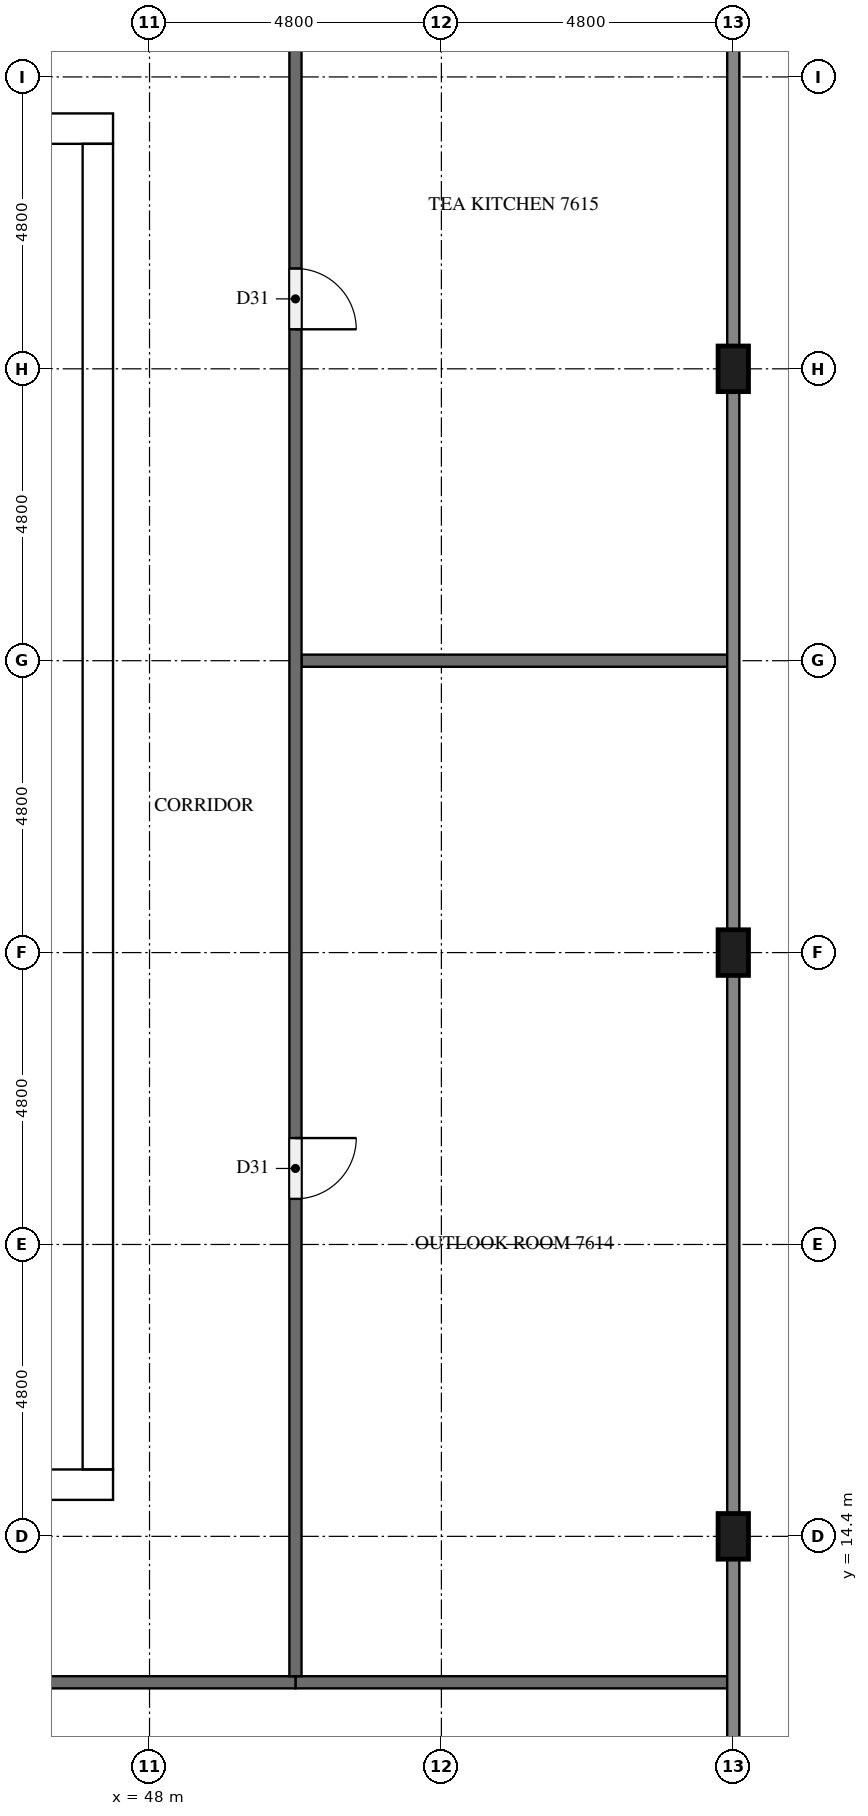
"""IFC4 building model, lengths in metres.
Left out: names, types, materials, properties, quantities, classifications, styles, units other than length and angle.
Written with IfcOpenShell. Run it as: python <this file> out.ifc"""

import sys

from ifc_helpers import new_model, si_unit, direction, frame, frame_2d, origin, origin_2d, place, context, subcontext, project, spatial, rectangle, extrude, element, fill, save


model = new_model("IFC4")
c1 = context("Model", 3, precision=1e-05, world=origin(), true_north=direction((0.0, 1.0)))
c2 = subcontext(c1, "Body", "Model", "MODEL_VIEW")
j1 = project(units=[si_unit("LENGTHUNIT", "METRE"), si_unit("PLANEANGLEUNIT", "RADIAN")], contexts=[c1])
p1 = place(None, origin())
s1 = spatial("IfcSite", under=j1, at=p1, CompositionType="ELEMENT")
p2 = place(p1, origin())
s2 = spatial("IfcBuilding", under=s1, at=p2, CompositionType="ELEMENT")
p3 = place(p2, frame((0.0, 0.0, 291.5)))
s3 = spatial("IfcBuildingStorey", under=s2, at=p3, CompositionType="ELEMENT", Elevation=291.5)
p4 = place(p3, frame((15.0, 15.25, 0.0), z_axis=(0.0, 0.0, 1.0), x_axis=(1.0, 0.0, 0.0)))
e1 = element("IfcWall", 1, at=p4, inside=s3, PredefinedType="SHEAR", context=c2, shape_type="SweptSolid", body=[
    extrude(rectangle(XDim=32.4, YDim=0.5, at=frame_2d((16.2, 0.0))), origin(), (0.0, 0.0, 1.0), 4.4),
])
p5 = place(p4, frame((15.3, 0.0, 0.0)))
e2 = element("IfcOpeningElement", 2, at=p5, cuts=e1, PredefinedType="OPENING", context=c2, shape_type="SweptSolid", body=[
    extrude(rectangle(XDim=1.8, YDim=2.1, at=frame_2d((0.9, 1.05))), frame((0.0, 0.26, 0.0), z_axis=(0.0, -1.0, 0.0), x_axis=(1.0, 0.0, 0.0)), (0.0, 0.0, 1.0), 0.52),
])
p6 = place(p3, frame((15.0, 37.55, 0.0), z_axis=(0.0, 0.0, 1.0), x_axis=(1.0, 0.0, 0.0)))
e3 = element("IfcWall", 3, at=p6, inside=s3, PredefinedType="SHEAR", context=c2, shape_type="SweptSolid", body=[
    extrude(rectangle(XDim=32.4, YDim=0.5, at=frame_2d((16.2, 0.0))), origin(), (0.0, 0.0, 1.0), 4.4),
])
p7 = place(p6, frame((15.3, 0.0, 0.0)))
e4 = element("IfcOpeningElement", 4, at=p7, cuts=e3, PredefinedType="OPENING", context=c2, shape_type="SweptSolid", body=[
    extrude(rectangle(XDim=1.8, YDim=2.1, at=frame_2d((0.9, 1.05))), frame((0.0, 0.26, 0.0), z_axis=(0.0, -1.0, 0.0), x_axis=(1.0, 0.0, 0.0)), (0.0, 0.0, 1.0), 0.52),
])
p8 = place(p6, frame((1.282, 0.0, 0.0)))
e5 = element("IfcOpeningElement", 5, at=p8, cuts=e3, PredefinedType="OPENING", context=c2, shape_type="SweptSolid", body=[
    extrude(rectangle(XDim=1.0, YDim=2.1, at=frame_2d((0.5, 1.05))), frame((0.0, 0.26, 0.0), z_axis=(0.0, -1.0, 0.0), x_axis=(1.0, 0.0, 0.0)), (0.0, 0.0, 1.0), 0.52),
])
p9 = place(p6, frame((5.082, 0.0, 0.0)))
e6 = element("IfcOpeningElement", 6, at=p9, cuts=e3, PredefinedType="OPENING", context=c2, shape_type="SweptSolid", body=[
    extrude(rectangle(XDim=1.0, YDim=2.1, at=frame_2d((0.5, 1.05))), frame((0.0, 0.26, 0.0), z_axis=(0.0, -1.0, 0.0), x_axis=(1.0, 0.0, 0.0)), (0.0, 0.0, 1.0), 0.52),
])
p10 = place(p3, frame((47.15, 15.5, 0.0), z_axis=(0.0, 0.0, 1.0), x_axis=(0.0, 1.0, 0.0)))
e7 = element("IfcWall", 7, at=p10, inside=s3, PredefinedType="SHEAR", context=c2, shape_type="SweptSolid", body=[
    extrude(rectangle(XDim=21.8, YDim=0.5, at=frame_2d((10.9, 0.0))), origin(), (0.0, 0.0, 1.0), 4.4),
])
p11 = place(p10, frame((10.6, 0.0, 0.0)))
e8 = element("IfcOpeningElement", 8, at=p11, cuts=e7, PredefinedType="OPENING", context=c2, shape_type="SweptSolid", body=[
    extrude(rectangle(XDim=1.2, YDim=2.1, at=frame_2d((0.6, 1.05))), frame((0.0, 0.26, 0.0), z_axis=(0.0, -1.0, 0.0), x_axis=(1.0, 0.0, 0.0)), (0.0, 0.0, 1.0), 0.52),
])
for number, where, z_axis, x_axis in (
    (9, (57.6, 14.4, 0.0), (0.0, 0.0, 1.0), (0.0, 1.0, 0.0)),
    (10, (57.6, 24.0, 0.0), (0.0, 0.0, 1.0), (0.0, 1.0, 0.0)),
    (11, (57.6, 33.6, 0.0), (0.0, 0.0, 1.0), (0.0, 1.0, 0.0)),
):
    element("IfcColumn", number, at=place(p3, frame(where, z_axis=z_axis, x_axis=x_axis)), inside=s3, PredefinedType="COLUMN", context=c2, shape_type="SweptSolid", body=[
        extrude(rectangle(XDim=0.75, YDim=0.5, at=origin_2d()), origin(), (0.0, 0.0, 1.0), 4.4),
    ])
p12 = place(p3, frame((50.4, 12.0, 0.0), z_axis=(0.0, 0.0, 1.0), x_axis=(1.0, 0.0, 0.0)))
e12 = element("IfcWall", 12, at=p12, inside=s3, PredefinedType="PARTITIONING", context=c2, shape_type="SweptSolid", body=[
    extrude(rectangle(XDim=7.1, YDim=0.2, at=frame_2d((3.55, 0.0))), origin(), (0.0, 0.0, 1.0), 4.4),
])
p13 = place(p3, frame((50.4, 12.0, 0.0), z_axis=(0.0, 0.0, 1.0), x_axis=(-1.0, 0.0, 0.0)))
e13 = element("IfcWall", 13, at=p13, inside=s3, PredefinedType="PARTITIONING", context=c2, shape_type="SweptSolid", body=[
    extrude(rectangle(XDim=12.0, YDim=0.2, at=frame_2d((6.0, 0.0))), origin(), (0.0, 0.0, 1.0), 4.4),
])
p14 = place(p13, frame((5.45, 0.0, 0.0)))
e14 = element("IfcOpeningElement", 14, at=p14, cuts=e13, PredefinedType="OPENING", context=c2, shape_type="SweptSolid", body=[
    extrude(rectangle(XDim=1.0, YDim=2.1, at=frame_2d((0.5, 1.05))), frame((0.0, 0.11, 0.0), z_axis=(0.0, -1.0, 0.0), x_axis=(1.0, 0.0, 0.0)), (0.0, 0.0, 1.0), 0.22),
])
p15 = place(p3, frame((50.5, 28.8, 0.0), z_axis=(0.0, 0.0, 1.0), x_axis=(1.0, 0.0, 0.0)))
e15 = element("IfcWall", 15, at=p15, inside=s3, PredefinedType="PARTITIONING", context=c2, shape_type="SweptSolid", body=[
    extrude(rectangle(XDim=7.0, YDim=0.2, at=frame_2d((3.5, 0.0))), origin(), (0.0, 0.0, 1.0), 4.4),
])
p16 = place(p3, frame((50.4, 40.7, 0.0), z_axis=(0.0, 0.0, 1.0), x_axis=(0.0, -1.0, 0.0)))
e16 = element("IfcWall", 16, at=p16, inside=s3, PredefinedType="PARTITIONING", context=c2, shape_type="SweptSolid", body=[
    extrude(rectangle(XDim=28.6, YDim=0.2, at=frame_2d((14.3, 0.0))), origin(), (0.0, 0.0, 1.0), 4.4),
])
p17 = place(p16, frame((19.75, 0.0, 0.0)))
e17 = element("IfcOpeningElement", 17, at=p17, cuts=e16, PredefinedType="OPENING", context=c2, shape_type="SweptSolid", body=[
    extrude(rectangle(XDim=1.0, YDim=2.1, at=frame_2d((0.5, 1.05))), frame((0.0, 0.11, 0.0), z_axis=(0.0, -1.0, 0.0), x_axis=(1.0, 0.0, 0.0)), (0.0, 0.0, 1.0), 0.22),
])
p18 = place(p16, frame((5.45, 0.0, 0.0)))
e18 = element("IfcOpeningElement", 18, at=p18, cuts=e16, PredefinedType="OPENING", context=c2, shape_type="SweptSolid", body=[
    extrude(rectangle(XDim=1.0, YDim=2.1, at=frame_2d((0.5, 1.05))), frame((0.0, 0.11, 0.0), z_axis=(0.0, -1.0, 0.0), x_axis=(1.0, 0.0, 0.0)), (0.0, 0.0, 1.0), 0.22),
])
p19 = place(p11, origin())
e19 = element("IfcDoor", 19, at=p19, inside=s3, OperationType="SINGLE_SWING_RIGHT", PredefinedType="DOOR", context=c2, shape_type="SweptSolid", body=[
    extrude(rectangle(XDim=1.2, YDim=2.1, at=frame_2d((0.6, 1.05))), frame((0.0, 0.025, 0.0), z_axis=(0.0, -1.0, 0.0), x_axis=(1.0, 0.0, 0.0)), (0.0, 0.0, 1.0), 0.05),
])
fill(e8, e19)
p20 = place(p17, origin())
e20 = element("IfcDoor", 20, at=p20, inside=s3, OperationType="SINGLE_SWING_LEFT", PredefinedType="DOOR", context=c2, shape_type="SweptSolid", body=[
    extrude(rectangle(XDim=1.0, YDim=2.1, at=frame_2d((0.5, 1.05))), frame((0.0, 0.025, 0.0), z_axis=(0.0, -1.0, 0.0), x_axis=(1.0, 0.0, 0.0)), (0.0, 0.0, 1.0), 0.05),
])
fill(e17, e20)
p21 = place(p18, origin())
e21 = element("IfcDoor", 21, at=p21, inside=s3, OperationType="SINGLE_SWING_RIGHT", PredefinedType="DOOR", context=c2, shape_type="SweptSolid", body=[
    extrude(rectangle(XDim=1.0, YDim=2.1, at=frame_2d((0.5, 1.05))), frame((0.0, 0.025, 0.0), z_axis=(0.0, -1.0, 0.0), x_axis=(1.0, 0.0, 0.0)), (0.0, 0.0, 1.0), 0.05),
])
fill(e18, e21)
save(model, sys.argv[1])
